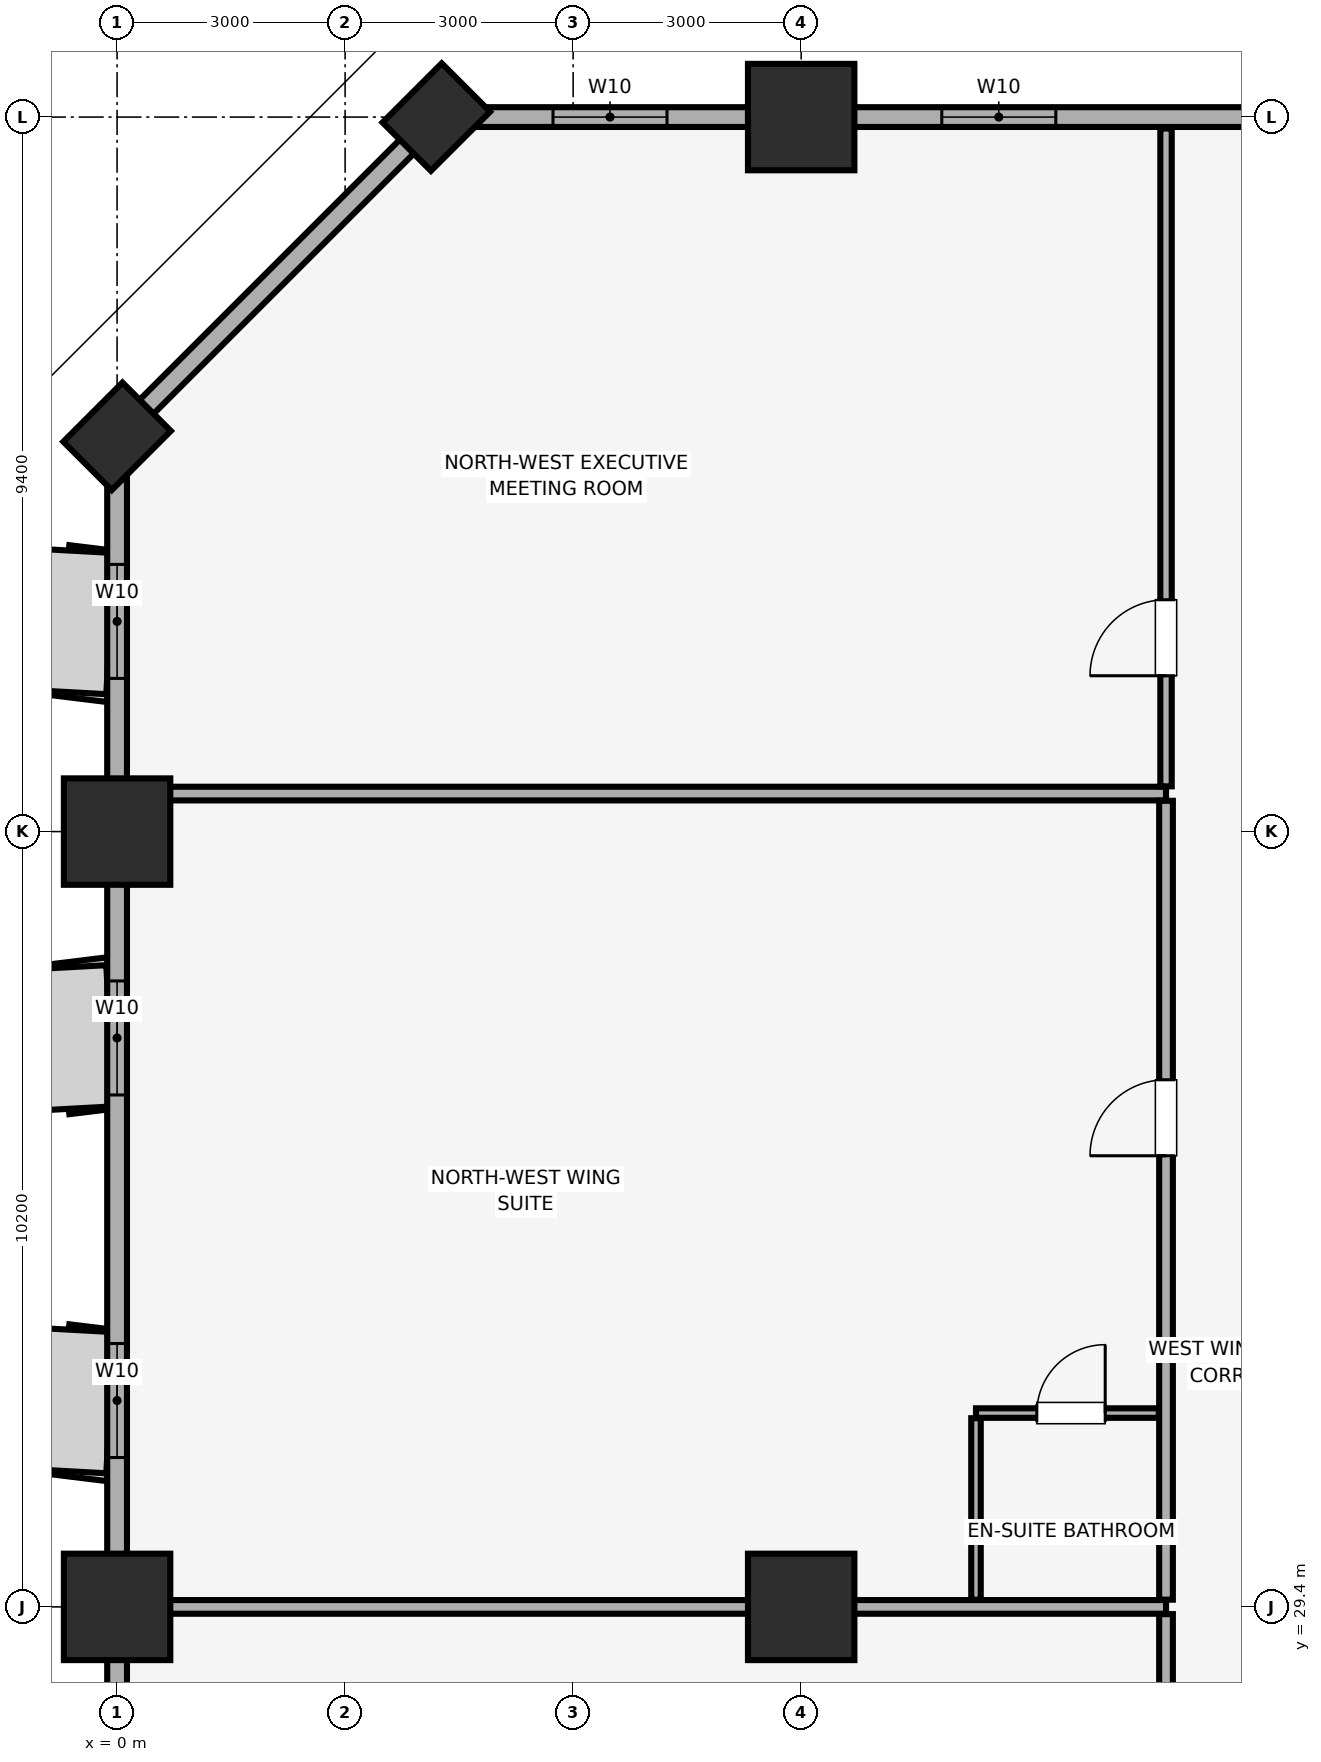
"""IFC4 building model, lengths in metres.
Left out: names, types, materials, properties, quantities, classifications, styles, units other than length and angle.
Written with IfcOpenShell. Run it as: python <this file> out.ifc"""

import sys

from ifc_helpers import new_model, si_unit, direction, frame, frame_2d, origin, origin_2d, place, context, subcontext, project, spatial, rectangle, extrude, element, fill, save


model = new_model("IFC4")
c1 = context("Model", 3, precision=1e-05, world=origin(), true_north=direction((0.0, 1.0)))
c2 = subcontext(c1, "Body", "Model", "MODEL_VIEW")
j1 = project(units=[si_unit("LENGTHUNIT", "METRE"), si_unit("PLANEANGLEUNIT", "RADIAN")], contexts=[c1])
p1 = place(None, origin())
s1 = spatial("IfcSite", under=j1, at=p1, CompositionType="ELEMENT")
p2 = place(p1, origin())
s2 = spatial("IfcBuilding", under=s1, at=p2, CompositionType="ELEMENT")
p3 = place(p2, frame((0.0, 0.0, 68.9)))
s3 = spatial("IfcBuildingStorey", under=s2, at=p3, CompositionType="ELEMENT", Elevation=68.9)
for number, where, z_axis, x_axis in (
    (1, (0.0, 29.4, 0.0), (0.0, 0.0, 1.0), (1.0, 0.0, 0.0)),
    (2, (0.0, 39.6, 0.0), (0.0, 0.0, 1.0), (1.0, 0.0, 0.0)),
):
    element("IfcColumn", number, at=place(p3, frame(where, z_axis=z_axis, x_axis=x_axis)), inside=s3, PredefinedType="COLUMN", context=c2, shape_type="SweptSolid", body=[
        extrude(rectangle(XDim=1.4, YDim=1.4, at=origin_2d()), origin(), (0.0, 0.0, 1.0), 3.51),
    ])
for number, where, z_axis, x_axis in (
    (3, (4.2, 49.0, 0.0), (0.0, 0.0, 1.0), (0.707, 0.707, 0.0)),
    (4, (0.0, 44.8, 0.0), (0.0, 0.0, 1.0), (0.707, 0.707, 0.0)),
):
    element("IfcColumn", number, at=place(p3, frame(where, z_axis=z_axis, x_axis=x_axis)), inside=s3, PredefinedType="PILASTER", context=c2, shape_type="SweptSolid", body=[
        extrude(rectangle(XDim=1.1, YDim=0.9, at=origin_2d()), origin(), (0.0, 0.0, 1.0), 3.51),
    ])
for number, where, z_axis, x_axis in (
    (5, (9.0, 29.4, 0.0), (0.0, 0.0, 1.0), (1.0, 0.0, 0.0)),
    (6, (9.0, 49.0, 0.0), (0.0, 0.0, 1.0), (1.0, 0.0, 0.0)),
):
    element("IfcColumn", number, at=place(p3, frame(where, z_axis=z_axis, x_axis=x_axis)), inside=s3, PredefinedType="COLUMN", context=c2, shape_type="SweptSolid", body=[
        extrude(rectangle(XDim=1.4, YDim=1.4, at=origin_2d()), origin(), (0.0, 0.0, 1.0), 3.51),
    ])
p4 = place(p3, frame((79.8, 49.0, 0.0), z_axis=(0.0, 0.0, 1.0), x_axis=(-1.0, 0.0, 0.0)))
e7 = element("IfcWall", 7, at=p4, inside=s3, PredefinedType="SOLIDWALL", context=c2, shape_type="SweptSolid", body=[
    extrude(rectangle(XDim=75.6, YDim=0.26, at=frame_2d((37.8, 0.0))), origin(), (0.0, 0.0, 1.0), 2.56),
])
p5 = place(p4, frame((72.565, 0.0, 0.85)))
e8 = element("IfcOpeningElement", 8, at=p5, cuts=e7, PredefinedType="OPENING", context=c2, shape_type="SweptSolid", body=[
    extrude(rectangle(XDim=1.5, YDim=1.4, at=frame_2d((0.75, 0.7))), frame((0.0, 0.14, 0.0), z_axis=(0.0, -1.0, 0.0), x_axis=(1.0, 0.0, 0.0)), (0.0, 0.0, 1.0), 0.28),
])
p6 = place(p4, frame((67.45, 0.0, 0.85)))
e9 = element("IfcOpeningElement", 9, at=p6, cuts=e7, PredefinedType="OPENING", context=c2, shape_type="SweptSolid", body=[
    extrude(rectangle(XDim=1.5, YDim=1.4, at=frame_2d((0.75, 0.7))), frame((0.0, 0.14, 0.0), z_axis=(0.0, -1.0, 0.0), x_axis=(1.0, 0.0, 0.0)), (0.0, 0.0, 1.0), 0.28),
])
p7 = place(p4, frame((6.65, 0.0, 0.85)))
e10 = element("IfcOpeningElement", 10, at=p7, cuts=e7, PredefinedType="OPENING", context=c2, shape_type="SweptSolid", body=[
    extrude(rectangle(XDim=1.5, YDim=1.4, at=frame_2d((0.75, 0.7))), frame((0.0, 0.14, 0.0), z_axis=(0.0, -1.0, 0.0), x_axis=(1.0, 0.0, 0.0)), (0.0, 0.0, 1.0), 0.28),
])
p8 = place(p4, frame((1.535, 0.0, 0.85)))
e11 = element("IfcOpeningElement", 11, at=p8, cuts=e7, PredefinedType="OPENING", context=c2, shape_type="SweptSolid", body=[
    extrude(rectangle(XDim=1.5, YDim=1.4, at=frame_2d((0.75, 0.7))), frame((0.0, 0.14, 0.0), z_axis=(0.0, -1.0, 0.0), x_axis=(1.0, 0.0, 0.0)), (0.0, 0.0, 1.0), 0.28),
])
p9 = place(p4, frame((51.365, 0.0, 0.9)))
e12 = element("IfcOpeningElement", 12, at=p9, cuts=e7, PredefinedType="OPENING", context=c2, shape_type="SweptSolid", body=[
    extrude(rectangle(XDim=1.5, YDim=1.4, at=frame_2d((0.75, 0.7))), frame((0.0, 0.14, 0.0), z_axis=(0.0, -1.0, 0.0), x_axis=(1.0, 0.0, 0.0)), (0.0, 0.0, 1.0), 0.28),
])
p10 = place(p4, frame((46.0, 0.0, 0.9)))
e13 = element("IfcOpeningElement", 13, at=p10, cuts=e7, PredefinedType="OPENING", context=c2, shape_type="SweptSolid", body=[
    extrude(rectangle(XDim=1.5, YDim=1.4, at=frame_2d((0.75, 0.7))), frame((0.0, 0.14, 0.0), z_axis=(0.0, -1.0, 0.0), x_axis=(1.0, 0.0, 0.0)), (0.0, 0.0, 1.0), 0.28),
])
p11 = place(p4, frame((29.15, 0.0, 0.9)))
e14 = element("IfcOpeningElement", 14, at=p11, cuts=e7, PredefinedType="OPENING", context=c2, shape_type="SweptSolid", body=[
    extrude(rectangle(XDim=1.5, YDim=1.4, at=frame_2d((0.75, 0.7))), frame((0.0, 0.14, 0.0), z_axis=(0.0, -1.0, 0.0), x_axis=(1.0, 0.0, 0.0)), (0.0, 0.0, 1.0), 0.28),
])
p12 = place(p4, frame((23.485, 0.0, 0.9)))
e15 = element("IfcOpeningElement", 15, at=p12, cuts=e7, PredefinedType="OPENING", context=c2, shape_type="SweptSolid", body=[
    extrude(rectangle(XDim=1.5, YDim=1.4, at=frame_2d((0.75, 0.7))), frame((0.0, 0.14, 0.0), z_axis=(0.0, -1.0, 0.0), x_axis=(1.0, 0.0, 0.0)), (0.0, 0.0, 1.0), 0.28),
])
p13 = place(p3, frame((4.2, 49.0, 0.0), z_axis=(0.0, 0.0, 1.0), x_axis=(-0.707106781187, -0.707106781187, 0.0)))
e16 = element("IfcWall", 16, at=p13, inside=s3, PredefinedType="SOLIDWALL", context=c2, shape_type="SweptSolid", body=[
    extrude(rectangle(XDim=5.94, YDim=0.26, at=frame_2d((2.97, 0.0))), origin(), (0.0, 0.0, 1.0), 2.56),
])
p14 = place(p3, frame((0.0, 44.8, 0.0), z_axis=(0.0, 0.0, 1.0), x_axis=(0.0, -1.0, 0.0)))
e17 = element("IfcWall", 17, at=p14, inside=s3, PredefinedType="SOLIDWALL", context=c2, shape_type="SweptSolid", body=[
    extrude(rectangle(XDim=40.6, YDim=0.26, at=frame_2d((20.3, 0.0))), origin(), (0.0, 0.0, 1.0), 2.56),
])
p15 = place(p14, frame((33.85, 0.0, 0.85)))
e18 = element("IfcOpeningElement", 18, at=p15, cuts=e17, PredefinedType="OPENING", context=c2, shape_type="SweptSolid", body=[
    extrude(rectangle(XDim=1.5, YDim=1.4, at=frame_2d((0.75, 0.7))), frame((0.0, 0.14, 0.0), z_axis=(0.0, -1.0, 0.0), x_axis=(1.0, 0.0, 0.0)), (0.0, 0.0, 1.0), 0.28),
])
p16 = place(p14, frame((25.29, 0.0, 0.85)))
e19 = element("IfcOpeningElement", 19, at=p16, cuts=e17, PredefinedType="OPENING", context=c2, shape_type="SweptSolid", body=[
    extrude(rectangle(XDim=1.5, YDim=1.4, at=frame_2d((0.75, 0.7))), frame((0.0, 0.14, 0.0), z_axis=(0.0, -1.0, 0.0), x_axis=(1.0, 0.0, 0.0)), (0.0, 0.0, 1.0), 0.28),
])
p17 = place(p14, frame((18.49, 0.0, 0.85)))
e20 = element("IfcOpeningElement", 20, at=p17, cuts=e17, PredefinedType="OPENING", context=c2, shape_type="SweptSolid", body=[
    extrude(rectangle(XDim=1.5, YDim=1.4, at=frame_2d((0.75, 0.7))), frame((0.0, 0.14, 0.0), z_axis=(0.0, -1.0, 0.0), x_axis=(1.0, 0.0, 0.0)), (0.0, 0.0, 1.0), 0.28),
])
p18 = place(p14, frame((11.935, 0.0, 0.85)))
e21 = element("IfcOpeningElement", 21, at=p18, cuts=e17, PredefinedType="OPENING", context=c2, shape_type="SweptSolid", body=[
    extrude(rectangle(XDim=1.5, YDim=1.4, at=frame_2d((0.75, 0.7))), frame((0.0, 0.14, 0.0), z_axis=(0.0, -1.0, 0.0), x_axis=(1.0, 0.0, 0.0)), (0.0, 0.0, 1.0), 0.28),
])
p19 = place(p14, frame((7.165, 0.0, 0.85)))
e22 = element("IfcOpeningElement", 22, at=p19, cuts=e17, PredefinedType="OPENING", context=c2, shape_type="SweptSolid", body=[
    extrude(rectangle(XDim=1.5, YDim=1.4, at=frame_2d((0.75, 0.7))), frame((0.0, 0.14, 0.0), z_axis=(0.0, -1.0, 0.0), x_axis=(1.0, 0.0, 0.0)), (0.0, 0.0, 1.0), 0.28),
])
p20 = place(p14, frame((1.685, 0.0, 0.85)))
e23 = element("IfcOpeningElement", 23, at=p20, cuts=e17, PredefinedType="OPENING", context=c2, shape_type="SweptSolid", body=[
    extrude(rectangle(XDim=1.5, YDim=1.4, at=frame_2d((0.75, 0.7))), frame((0.0, 0.14, 0.0), z_axis=(0.0, -1.0, 0.0), x_axis=(1.0, 0.0, 0.0)), (0.0, 0.0, 1.0), 0.28),
])
p21 = place(p3, frame((0.15, 29.4, 0.0), z_axis=(0.0, 0.0, 1.0), x_axis=(1.0, 0.0, 0.0)))
e24 = element("IfcWall", 24, at=p21, inside=s3, PredefinedType="PARTITIONING", context=c2, shape_type="SweptSolid", body=[
    extrude(rectangle(XDim=13.65, YDim=0.18, at=frame_2d((6.825, 0.0))), origin(), (0.0, 0.0, 1.0), 2.86),
])
p22 = place(p3, frame((13.8, 22.215, 0.0), z_axis=(0.0, 0.0, 1.0), x_axis=(0.0, 1.0, 0.0)))
e25 = element("IfcWall", 25, at=p22, inside=s3, PredefinedType="PARTITIONING", context=c2, shape_type="SweptSolid", body=[
    extrude(rectangle(XDim=7.09, YDim=0.18, at=frame_2d((3.545, 0.0))), origin(), (0.0, 0.0, 1.0), 3.51),
])
p23 = place(p22, frame((4.13, 0.0, 0.0)))
e26 = element("IfcOpeningElement", 26, at=p23, cuts=e25, PredefinedType="OPENING", context=c2, shape_type="SweptSolid", body=[
    extrude(rectangle(XDim=1.0, YDim=2.15, at=frame_2d((0.5, 1.075))), frame((0.0, 0.1, 0.0), z_axis=(0.0, -1.0, 0.0), x_axis=(1.0, 0.0, 0.0)), (0.0, 0.0, 1.0), 0.2),
])
p24 = place(p3, frame((0.15, 40.1, 0.0), z_axis=(0.0, 0.0, 1.0), x_axis=(1.0, 0.0, 0.0)))
e27 = element("IfcWall", 27, at=p24, inside=s3, PredefinedType="PARTITIONING", context=c2, shape_type="SweptSolid", body=[
    extrude(rectangle(XDim=13.65, YDim=0.18, at=frame_2d((6.825, 0.0))), origin(), (0.0, 0.0, 1.0), 3.51),
])
p25 = place(p3, frame((13.8, 29.495, 0.0), z_axis=(0.0, 0.0, 1.0), x_axis=(0.0, 1.0, 0.0)))
e28 = element("IfcWall", 28, at=p25, inside=s3, PredefinedType="PARTITIONING", context=c2, shape_type="SweptSolid", body=[
    extrude(rectangle(XDim=10.51, YDim=0.18, at=frame_2d((5.255, 0.0))), origin(), (0.0, 0.0, 1.0), 3.51),
])
p26 = place(p25, frame((5.84, 0.0, 0.0)))
e29 = element("IfcOpeningElement", 29, at=p26, cuts=e28, PredefinedType="OPENING", context=c2, shape_type="SweptSolid", body=[
    extrude(rectangle(XDim=1.0, YDim=2.15, at=frame_2d((0.5, 1.075))), frame((0.0, 0.1, 0.0), z_axis=(0.0, -1.0, 0.0), x_axis=(1.0, 0.0, 0.0)), (0.0, 0.0, 1.0), 0.2),
])
p27 = place(p3, frame((11.3, 31.95, 0.0), z_axis=(0.0, 0.0, 1.0), x_axis=(1.0, 0.0, 0.0)))
e30 = element("IfcWall", 30, at=p27, inside=s3, PredefinedType="PARTITIONING", context=c2, shape_type="SweptSolid", body=[
    extrude(rectangle(XDim=2.405, YDim=0.125, at=frame_2d((1.203, 0.0))), origin(), (0.0, 0.0, 1.0), 3.51),
])
p28 = place(p27, frame((0.8, 0.0, 0.0)))
e31 = element("IfcOpeningElement", 31, at=p28, cuts=e30, PredefinedType="OPENING", context=c2, shape_type="SweptSolid", body=[
    extrude(rectangle(XDim=0.9, YDim=2.1, at=frame_2d((0.45, 1.05))), frame((0.0, 0.073, 0.0), z_axis=(0.0, -1.0, 0.0), x_axis=(1.0, 0.0, 0.0)), (0.0, 0.0, 1.0), 0.145),
])
p29 = place(p3, frame((11.3, 29.495, 0.0), z_axis=(0.0, 0.0, 1.0), x_axis=(0.0, 1.0, 0.0)))
e32 = element("IfcWall", 32, at=p29, inside=s3, PredefinedType="PARTITIONING", context=c2, shape_type="SweptSolid", body=[
    extrude(rectangle(XDim=2.387, YDim=0.125, at=frame_2d((1.194, 0.0))), origin(), (0.0, 0.0, 1.0), 3.51),
])
p30 = place(p3, frame((13.8, 40.195, 0.0), z_axis=(0.0, 0.0, 1.0), x_axis=(0.0, 1.0, 0.0)))
e33 = element("IfcWall", 33, at=p30, inside=s3, PredefinedType="PARTITIONING", context=c2, shape_type="SweptSolid", body=[
    extrude(rectangle(XDim=8.655, YDim=0.15, at=frame_2d((4.328, 0.0))), origin(), (0.0, 0.0, 1.0), 3.51),
])
p31 = place(p30, frame((1.455, 0.0, 0.0)))
e34 = element("IfcOpeningElement", 34, at=p31, cuts=e33, PredefinedType="OPENING", context=c2, shape_type="SweptSolid", body=[
    extrude(rectangle(XDim=1.0, YDim=2.15, at=frame_2d((0.5, 1.075))), frame((0.0, 0.085, 0.0), z_axis=(0.0, -1.0, 0.0), x_axis=(1.0, 0.0, 0.0)), (0.0, 0.0, 1.0), 0.17),
])
p32 = place(p18, origin())
e35 = element("IfcWindow", 35, at=p32, inside=s3, PartitioningType="SINGLE_PANEL", PredefinedType="WINDOW", context=c2, shape_type="SweptSolid", body=[
    extrude(rectangle(XDim=1.5, YDim=1.4, at=frame_2d((0.75, 0.7))), frame((0.0, 0.03, 0.0), z_axis=(0.0, -1.0, 0.0), x_axis=(1.0, 0.0, 0.0)), (0.0, 0.0, 1.0), 0.06),
])
fill(e21, e35)
p33 = place(p19, origin())
e36 = element("IfcWindow", 36, at=p33, inside=s3, PartitioningType="SINGLE_PANEL", PredefinedType="WINDOW", context=c2, shape_type="SweptSolid", body=[
    extrude(rectangle(XDim=1.5, YDim=1.4, at=frame_2d((0.75, 0.7))), frame((0.0, 0.03, 0.0), z_axis=(0.0, -1.0, 0.0), x_axis=(1.0, 0.0, 0.0)), (0.0, 0.0, 1.0), 0.06),
])
fill(e22, e36)
p34 = place(p20, origin())
e37 = element("IfcWindow", 37, at=p34, inside=s3, PartitioningType="SINGLE_PANEL", PredefinedType="WINDOW", context=c2, shape_type="SweptSolid", body=[
    extrude(rectangle(XDim=1.5, YDim=1.4, at=frame_2d((0.75, 0.7))), frame((0.0, 0.03, 0.0), z_axis=(0.0, -1.0, 0.0), x_axis=(1.0, 0.0, 0.0)), (0.0, 0.0, 1.0), 0.06),
])
fill(e23, e37)
p35 = place(p5, origin())
e38 = element("IfcWindow", 38, at=p35, inside=s3, PartitioningType="SINGLE_PANEL", PredefinedType="WINDOW", context=c2, shape_type="SweptSolid", body=[
    extrude(rectangle(XDim=1.5, YDim=1.4, at=frame_2d((0.75, 0.7))), frame((0.0, 0.03, 0.0), z_axis=(0.0, -1.0, 0.0), x_axis=(1.0, 0.0, 0.0)), (0.0, 0.0, 1.0), 0.06),
])
fill(e8, e38)
p36 = place(p6, origin())
e39 = element("IfcWindow", 39, at=p36, inside=s3, PartitioningType="SINGLE_PANEL", PredefinedType="WINDOW", context=c2, shape_type="SweptSolid", body=[
    extrude(rectangle(XDim=1.5, YDim=1.4, at=frame_2d((0.75, 0.7))), frame((0.0, 0.03, 0.0), z_axis=(0.0, -1.0, 0.0), x_axis=(1.0, 0.0, 0.0)), (0.0, 0.0, 1.0), 0.06),
])
fill(e9, e39)
p37 = place(p26, origin())
e40 = element("IfcDoor", 40, at=p37, inside=s3, OperationType="SINGLE_SWING_LEFT", PredefinedType="DOOR", context=c2, shape_type="SweptSolid", body=[
    extrude(rectangle(XDim=1.0, YDim=2.15, at=frame_2d((0.5, 1.075))), frame((0.0, 0.025, 0.0), z_axis=(0.0, -1.0, 0.0), x_axis=(1.0, 0.0, 0.0)), (0.0, 0.0, 1.0), 0.05),
])
fill(e29, e40)
p38 = place(p28, origin())
e41 = element("IfcDoor", 41, at=p38, inside=s3, OperationType="SINGLE_SWING_RIGHT", PredefinedType="DOOR", context=c2, shape_type="SweptSolid", body=[
    extrude(rectangle(XDim=0.9, YDim=2.1, at=frame_2d((0.45, 1.05))), frame((0.0, 0.025, 0.0), z_axis=(0.0, -1.0, 0.0), x_axis=(1.0, 0.0, 0.0)), (0.0, 0.0, 1.0), 0.05),
])
fill(e31, e41)
p39 = place(p31, origin())
e42 = element("IfcDoor", 42, at=p39, inside=s3, OperationType="SINGLE_SWING_LEFT", PredefinedType="DOOR", context=c2, shape_type="SweptSolid", body=[
    extrude(rectangle(XDim=1.0, YDim=2.15, at=frame_2d((0.5, 1.075))), frame((0.0, 0.025, 0.0), z_axis=(0.0, -1.0, 0.0), x_axis=(1.0, 0.0, 0.0)), (0.0, 0.0, 1.0), 0.05),
])
fill(e34, e42)
save(model, sys.argv[1])
